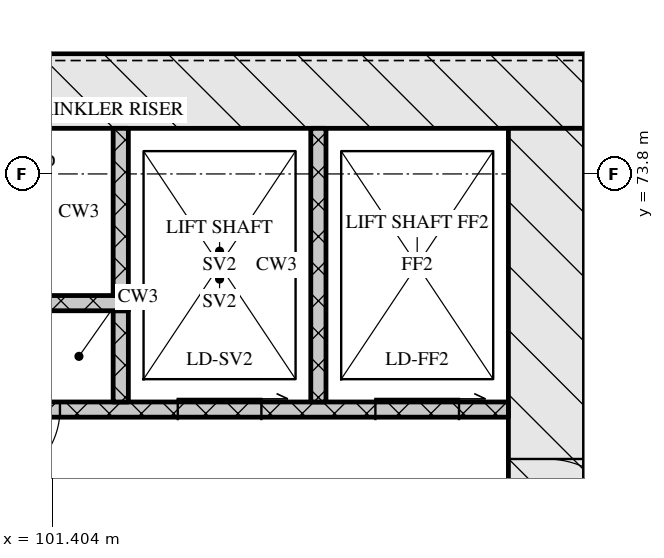
"""IFC4 building model, lengths in metres.
Left out: names, types, materials, properties, quantities, classifications, styles, units other than length and angle.
Written with IfcOpenShell. Run it as: python <this file> out.ifc"""

import sys

from ifc_helpers import new_model, si_unit, direction, frame, frame_2d, origin, place, context, subcontext, project, spatial, rectangle, extrude, element, fill, save


model = new_model("IFC4")
c1 = context("Model", 3, precision=1e-05, world=origin(), true_north=direction((0.0, 1.0)))
c2 = subcontext(c1, "Body", "Model", "MODEL_VIEW")
j1 = project(units=[si_unit("LENGTHUNIT", "METRE"), si_unit("PLANEANGLEUNIT", "RADIAN")], contexts=[c1])
p1 = place(None, origin())
s1 = spatial("IfcSite", under=j1, at=p1, CompositionType="ELEMENT")
p2 = place(p1, origin())
s2 = spatial("IfcBuilding", under=s1, at=p2, CompositionType="ELEMENT")
p3 = place(p2, frame((0.0, 0.0, 120.45)))
s3 = spatial("IfcBuildingStorey", under=s2, at=p3, CompositionType="ELEMENT", Elevation=120.45)
p4 = place(p3, frame((66.8, 74.9, 0.0), z_axis=(0.0, 0.0, 1.0), x_axis=(1.0, 0.0, 0.0)))
e1 = element("IfcWall", 1, at=p4, inside=s3, PredefinedType="SOLIDWALL", context=c2, shape_type="SweptSolid", body=[
    extrude(rectangle(XDim=41.6, YDim=1.0, at=frame_2d((20.8, 0.0))), origin(), (0.0, 0.0, 1.0), 3.32),
])
p5 = place(p3, frame((107.9, 62.4, 0.0), z_axis=(0.0, 0.0, 1.0), x_axis=(0.0, 1.0, 0.0)))
e2 = element("IfcWall", 2, at=p5, inside=s3, PredefinedType="SOLIDWALL", context=c2, shape_type="SweptSolid", body=[
    extrude(rectangle(XDim=12.0, YDim=1.0, at=frame_2d((6.0, 0.0))), origin(), (0.0, 0.0, 1.0), 3.32),
])
p6 = place(p5, frame((6.45, 0.0, 0.0)))
e3 = element("IfcOpeningElement", 3, at=p6, cuts=e2, PredefinedType="OPENING", context=c2, shape_type="SweptSolid", body=[
    extrude(rectangle(XDim=1.2, YDim=2.1, at=frame_2d((0.6, 1.05))), frame((0.0, 0.51, 0.0), z_axis=(0.0, -1.0, 0.0), x_axis=(1.0, 0.0, 0.0)), (0.0, 0.0, 1.0), 1.02),
])
p7 = place(p3, frame((67.8, 70.7, 0.0), z_axis=(0.0, 0.0, 1.0), x_axis=(1.0, 0.0, 0.0)))
e4 = element("IfcWall", 4, at=p7, inside=s3, PredefinedType="SOLIDWALL", context=c2, shape_type="SweptSolid", body=[
    extrude(rectangle(XDim=39.6, YDim=0.2, at=frame_2d((19.8, 0.0))), origin(), (0.0, 0.0, 1.0), 3.32),
])
p8 = place(p7, frame((0.65, 0.0, 0.0)))
e5 = element("IfcOpeningElement", 5, at=p8, cuts=e4, PredefinedType="OPENING", context=c2, shape_type="SweptSolid", body=[
    extrude(rectangle(XDim=1.1, YDim=2.1, at=frame_2d((0.55, 1.05))), frame((0.0, 0.11, 0.0), z_axis=(0.0, -1.0, 0.0), x_axis=(1.0, 0.0, 0.0)), (0.0, 0.0, 1.0), 0.22),
])
p9 = place(p7, frame((3.25, 0.0, 0.0)))
e6 = element("IfcOpeningElement", 6, at=p9, cuts=e4, PredefinedType="OPENING", context=c2, shape_type="SweptSolid", body=[
    extrude(rectangle(XDim=1.1, YDim=2.1, at=frame_2d((0.55, 1.05))), frame((0.0, 0.11, 0.0), z_axis=(0.0, -1.0, 0.0), x_axis=(1.0, 0.0, 0.0)), (0.0, 0.0, 1.0), 0.22),
])
p10 = place(p7, frame((5.9, 0.0, 0.0)))
e7 = element("IfcOpeningElement", 7, at=p10, cuts=e4, PredefinedType="OPENING", context=c2, shape_type="SweptSolid", body=[
    extrude(rectangle(XDim=1.0, YDim=2.1, at=frame_2d((0.5, 1.05))), frame((0.0, 0.11, 0.0), z_axis=(0.0, -1.0, 0.0), x_axis=(1.0, 0.0, 0.0)), (0.0, 0.0, 1.0), 0.22),
])
p11 = place(p7, frame((21.7, 0.0, 0.0)))
e8 = element("IfcOpeningElement", 8, at=p11, cuts=e4, PredefinedType="OPENING", context=c2, shape_type="SweptSolid", body=[
    extrude(rectangle(XDim=1.0, YDim=2.1, at=frame_2d((0.5, 1.05))), frame((0.0, 0.11, 0.0), z_axis=(0.0, -1.0, 0.0), x_axis=(1.0, 0.0, 0.0)), (0.0, 0.0, 1.0), 0.22),
])
p12 = place(p7, frame((32.7, 0.0, 0.0)))
e9 = element("IfcOpeningElement", 9, at=p12, cuts=e4, PredefinedType="OPENING", context=c2, shape_type="SweptSolid", body=[
    extrude(rectangle(XDim=1.0, YDim=2.1, at=frame_2d((0.5, 1.05))), frame((0.0, 0.11, 0.0), z_axis=(0.0, -1.0, 0.0), x_axis=(1.0, 0.0, 0.0)), (0.0, 0.0, 1.0), 0.22),
])
p13 = place(p7, frame((35.25, 0.0, 0.0)))
e10 = element("IfcOpeningElement", 10, at=p13, cuts=e4, PredefinedType="OPENING", context=c2, shape_type="SweptSolid", body=[
    extrude(rectangle(XDim=1.1, YDim=2.1, at=frame_2d((0.55, 1.05))), frame((0.0, 0.11, 0.0), z_axis=(0.0, -1.0, 0.0), x_axis=(1.0, 0.0, 0.0)), (0.0, 0.0, 1.0), 0.22),
])
p14 = place(p7, frame((37.85, 0.0, 0.0)))
e11 = element("IfcOpeningElement", 11, at=p14, cuts=e4, PredefinedType="OPENING", context=c2, shape_type="SweptSolid", body=[
    extrude(rectangle(XDim=1.1, YDim=2.1, at=frame_2d((0.55, 1.05))), frame((0.0, 0.11, 0.0), z_axis=(0.0, -1.0, 0.0), x_axis=(1.0, 0.0, 0.0)), (0.0, 0.0, 1.0), 0.22),
])
p15 = place(p3, frame((102.3, 70.8, 0.0), z_axis=(0.0, 0.0, 1.0), x_axis=(0.0, 1.0, 0.0)))
e12 = element("IfcWall", 12, at=p15, inside=s3, PredefinedType="SOLIDWALL", context=c2, shape_type="SweptSolid", body=[
    extrude(rectangle(XDim=1.2, YDim=0.2, at=frame_2d((0.6, 0.0))), origin(), (0.0, 0.0, 1.0), 3.32),
])
p16 = place(p3, frame((104.9, 70.8, 0.0), z_axis=(0.0, 0.0, 1.0), x_axis=(0.0, 1.0, 0.0)))
e13 = element("IfcWall", 13, at=p16, inside=s3, PredefinedType="SOLIDWALL", context=c2, shape_type="SweptSolid", body=[
    extrude(rectangle(XDim=3.6, YDim=0.2, at=frame_2d((1.8, 0.0))), origin(), (0.0, 0.0, 1.0), 3.32),
])
p17 = place(p3, frame((95.08, 72.1, 0.0), z_axis=(0.0, 0.0, 1.0), x_axis=(1.0, 0.0, 0.0)))
e14 = element("IfcWall", 14, at=p17, inside=s3, PredefinedType="SOLIDWALL", context=c2, shape_type="SweptSolid", body=[
    extrude(rectangle(XDim=7.32, YDim=0.2, at=frame_2d((3.66, 0.0))), origin(), (0.0, 0.0, 1.0), 3.32),
])
p18 = place(p17, frame((0.52, 0.0, 0.0)))
e15 = element("IfcOpeningElement", 15, at=p18, cuts=e14, PredefinedType="OPENING", context=c2, shape_type="SweptSolid", body=[
    extrude(rectangle(XDim=0.9, YDim=2.1, at=frame_2d((0.45, 1.05))), frame((0.0, 0.11, 0.0), z_axis=(0.0, -1.0, 0.0), x_axis=(1.0, 0.0, 0.0)), (0.0, 0.0, 1.0), 0.22),
])
p19 = place(p17, frame((2.48, 0.0, 0.0)))
e16 = element("IfcOpeningElement", 16, at=p19, cuts=e14, PredefinedType="OPENING", context=c2, shape_type="SweptSolid", body=[
    extrude(rectangle(XDim=0.9, YDim=2.1, at=frame_2d((0.45, 1.05))), frame((0.0, 0.11, 0.0), z_axis=(0.0, -1.0, 0.0), x_axis=(1.0, 0.0, 0.0)), (0.0, 0.0, 1.0), 0.22),
])
p20 = place(p17, frame((5.17, 0.0, 0.0)))
e17 = element("IfcOpeningElement", 17, at=p20, cuts=e14, PredefinedType="OPENING", context=c2, shape_type="SweptSolid", body=[
    extrude(rectangle(XDim=0.9, YDim=2.1, at=frame_2d((0.45, 1.05))), frame((0.0, 0.11, 0.0), z_axis=(0.0, -1.0, 0.0), x_axis=(1.0, 0.0, 0.0)), (0.0, 0.0, 1.0), 0.22),
])
p21 = place(p3, frame((102.3, 72.2, 0.0), z_axis=(0.0, 0.0, 1.0), x_axis=(0.0, 1.0, 0.0)))
e18 = element("IfcWall", 18, at=p21, inside=s3, PredefinedType="SOLIDWALL", context=c2, shape_type="SweptSolid", body=[
    extrude(rectangle(XDim=2.2, YDim=0.2, at=frame_2d((1.1, 0.0))), origin(), (0.0, 0.0, 1.0), 3.32),
])
p22 = place(p6, origin())
e19 = element("IfcDoor", 19, at=p22, inside=s3, OperationType="SINGLE_SWING_RIGHT", PredefinedType="DOOR", context=c2, shape_type="SweptSolid", body=[
    extrude(rectangle(XDim=1.2, YDim=2.1, at=frame_2d((0.6, 1.05))), frame((0.0, 0.025, 0.0), z_axis=(0.0, -1.0, 0.0), x_axis=(1.0, 0.0, 0.0)), (0.0, 0.0, 1.0), 0.05),
])
fill(e3, e19)
p23 = place(p12, origin())
e20 = element("IfcDoor", 20, at=p23, inside=s3, OperationType="SINGLE_SWING_RIGHT", PredefinedType="DOOR", context=c2, shape_type="SweptSolid", body=[
    extrude(rectangle(XDim=1.0, YDim=2.1, at=frame_2d((0.5, 1.05))), frame((0.0, 0.025, 0.0), z_axis=(0.0, -1.0, 0.0), x_axis=(1.0, 0.0, 0.0)), (0.0, 0.0, 1.0), 0.05),
])
fill(e9, e20)
p24 = place(p13, origin())
e21 = element("IfcDoor", 21, at=p24, inside=s3, OperationType="SLIDING_TO_RIGHT", PredefinedType="DOOR", context=c2, shape_type="SweptSolid", body=[
    extrude(rectangle(XDim=1.1, YDim=2.1, at=frame_2d((0.55, 1.05))), frame((0.0, 0.025, 0.0), z_axis=(0.0, -1.0, 0.0), x_axis=(1.0, 0.0, 0.0)), (0.0, 0.0, 1.0), 0.05),
])
fill(e10, e21)
p25 = place(p14, origin())
e22 = element("IfcDoor", 22, at=p25, inside=s3, OperationType="SLIDING_TO_RIGHT", PredefinedType="DOOR", context=c2, shape_type="SweptSolid", body=[
    extrude(rectangle(XDim=1.1, YDim=2.1, at=frame_2d((0.55, 1.05))), frame((0.0, 0.025, 0.0), z_axis=(0.0, -1.0, 0.0), x_axis=(1.0, 0.0, 0.0)), (0.0, 0.0, 1.0), 0.05),
])
fill(e11, e22)
save(model, sys.argv[1])
